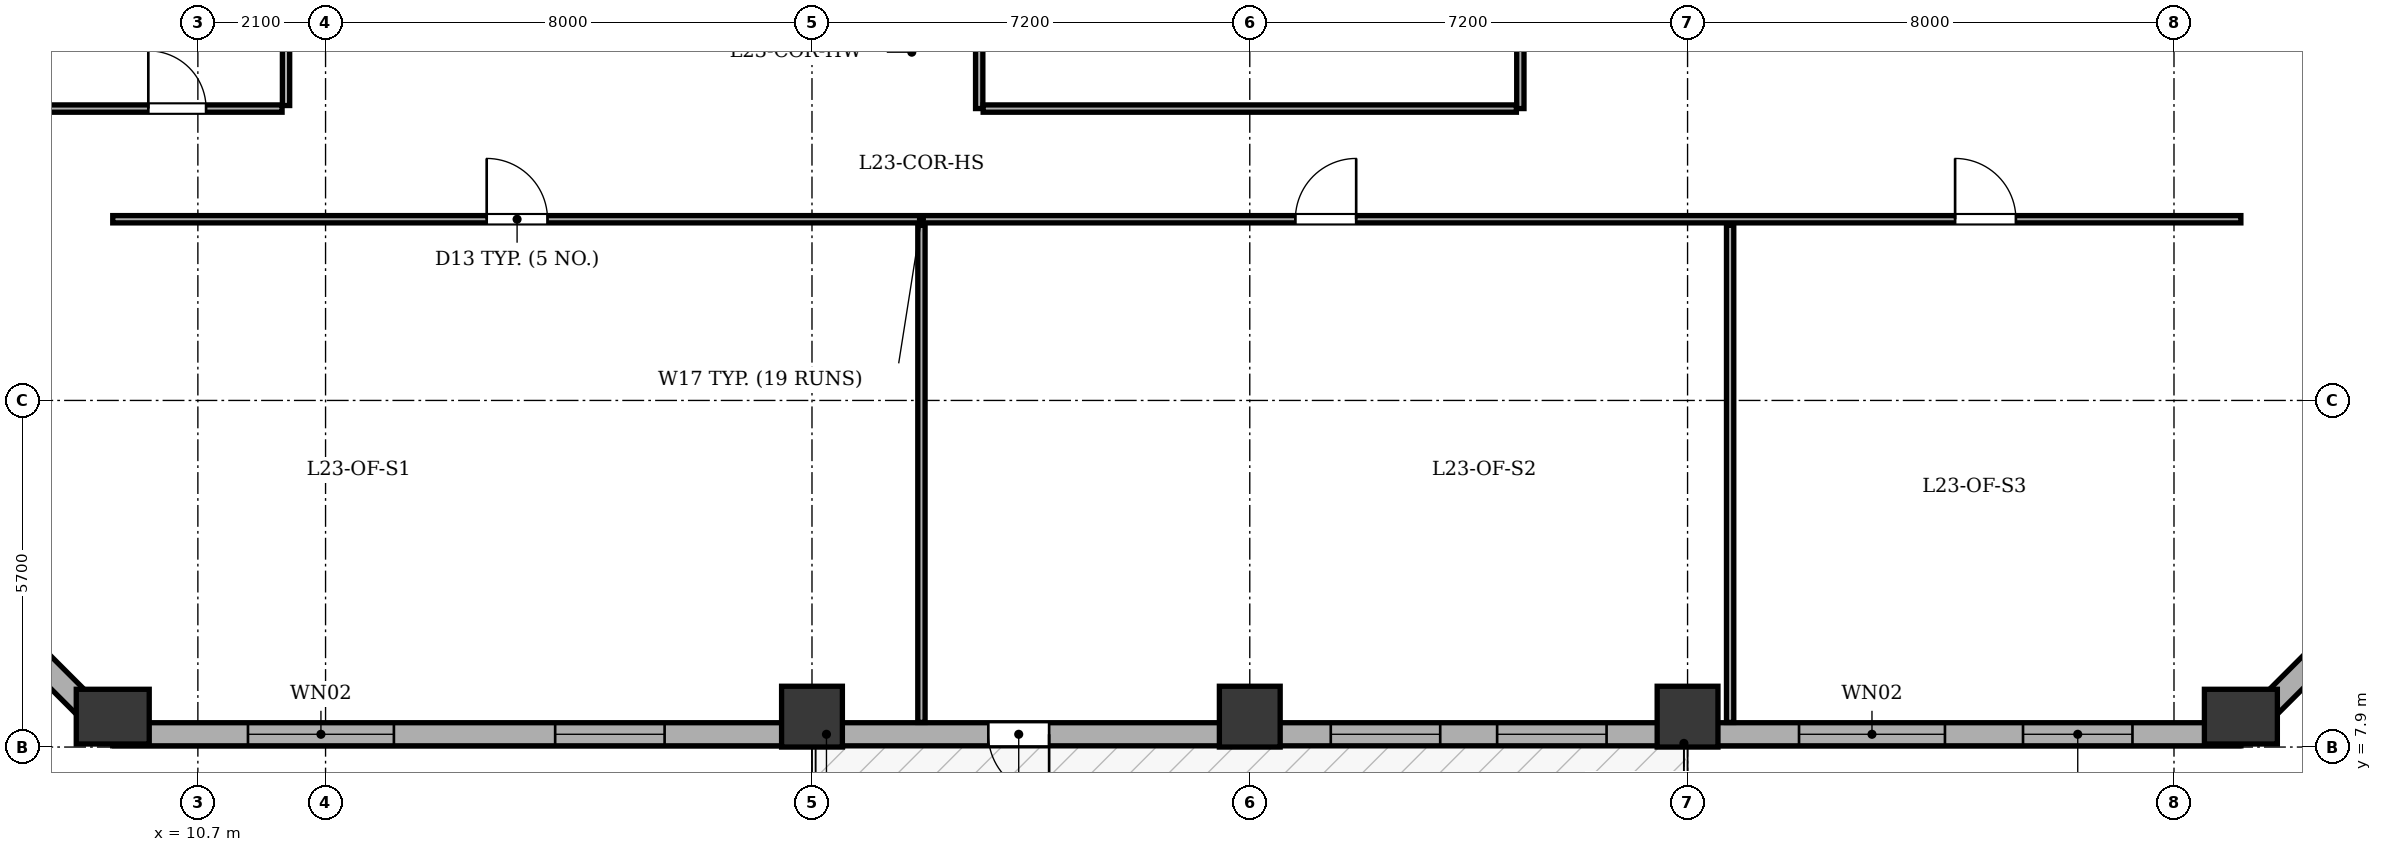
"""IFC4 building model, lengths in metres.
Left out: names, types, materials, properties, quantities, classifications, styles, units other than length and angle.
Written with IfcOpenShell. Run it as: python <this file> out.ifc"""

import sys

from ifc_helpers import new_model, si_unit, direction, frame, frame_2d, origin, origin_2d, place, context, subcontext, project, spatial, rectangle, extrude, element, fill, save


model = new_model("IFC4")
c1 = context("Model", 3, precision=1e-05, world=origin(), true_north=direction((0.0, 1.0)))
c2 = subcontext(c1, "Body", "Model", "MODEL_VIEW")
j1 = project(units=[si_unit("LENGTHUNIT", "METRE"), si_unit("PLANEANGLEUNIT", "RADIAN")], contexts=[c1])
p1 = place(None, origin())
s1 = spatial("IfcSite", under=j1, at=p1, CompositionType="ELEMENT")
p2 = place(p1, origin())
s2 = spatial("IfcBuilding", under=s1, at=p2, CompositionType="ELEMENT")
p3 = place(p2, frame((0.0, 0.0, 94.5)))
s3 = spatial("IfcBuildingStorey", under=s2, at=p3, CompositionType="ELEMENT", Elevation=94.5)
p4 = place(p3, frame((9.3, 8.4, 0.0), z_axis=(0.0, 0.0, 1.0), x_axis=(1.0, 0.0, 0.0)))
e1 = element("IfcColumn", 1, at=p4, inside=s3, PredefinedType="COLUMN", context=c2, shape_type="SweptSolid", body=[
    extrude(rectangle(XDim=0.9, YDim=1.2, at=origin_2d()), origin(), (0.0, 0.0, 1.0), 3.9),
])
for number, where, z_axis, x_axis in (
    (2, (20.8, 8.4, 0.0), (0.0, 0.0, 1.0), (1.0, 0.0, 0.0)),
    (3, (28.0, 8.4, 0.0), (0.0, 0.0, 1.0), (1.0, 0.0, 0.0)),
    (4, (35.2, 8.4, 0.0), (0.0, 0.0, 1.0), (1.0, 0.0, 0.0)),
):
    element("IfcColumn", number, at=place(p3, frame(where, z_axis=z_axis, x_axis=x_axis)), inside=s3, PredefinedType="COLUMN", context=c2, shape_type="SweptSolid", body=[
        extrude(rectangle(XDim=1.0, YDim=1.0, at=origin_2d()), origin(), (0.0, 0.0, 1.0), 3.9),
    ])
p5 = place(p3, frame((44.3, 8.4, 0.0), z_axis=(0.0, 0.0, 1.0), x_axis=(1.0, 0.0, 0.0)))
e5 = element("IfcColumn", 5, at=p5, inside=s3, PredefinedType="COLUMN", context=c2, shape_type="SweptSolid", body=[
    extrude(rectangle(XDim=0.9, YDim=1.2, at=origin_2d()), origin(), (0.0, 0.0, 1.0), 3.9),
])
p6 = place(p3, frame((44.3, 8.11, 0.0), z_axis=(0.0, 0.0, 1.0), x_axis=(-1.0, 0.0, 0.0)))
e6 = element("IfcWall", 6, at=p6, inside=s3, PredefinedType="STANDARD", context=c2, shape_type="SweptSolid", body=[
    extrude(rectangle(XDim=35.0, YDim=0.38, at=frame_2d((17.5, 0.0))), origin(), (0.0, 0.0, 1.0), 3.135),
])
p7 = place(p6, frame((19.6, 0.0, 0.0)))
e7 = element("IfcOpeningElement", 7, at=p7, cuts=e6, PredefinedType="OPENING", context=c2, shape_type="SweptSolid", body=[
    extrude(rectangle(XDim=1.0, YDim=2.02, at=frame_2d((0.5, 1.01))), frame((0.0, 0.2, 0.0), z_axis=(0.0, -1.0, 0.0), x_axis=(1.0, 0.0, 0.0)), (0.0, 0.0, 1.0), 0.4),
])
p8 = place(p6, frame((1.783, 0.0, 0.8)))
e8 = element("IfcOpeningElement", 8, at=p8, cuts=e6, PredefinedType="OPENING", context=c2, shape_type="SweptSolid", body=[
    extrude(rectangle(XDim=1.8, YDim=1.9, at=frame_2d((0.9, 0.95))), frame((0.0, 0.2, 0.0), z_axis=(0.0, -1.0, 0.0), x_axis=(1.0, 0.0, 0.0)), (0.0, 0.0, 1.0), 0.4),
])
p9 = place(p6, frame((4.867, 0.0, 0.8)))
e9 = element("IfcOpeningElement", 9, at=p9, cuts=e6, PredefinedType="OPENING", context=c2, shape_type="SweptSolid", body=[
    extrude(rectangle(XDim=2.4, YDim=1.9, at=frame_2d((1.2, 0.95))), frame((0.0, 0.2, 0.0), z_axis=(0.0, -1.0, 0.0), x_axis=(1.0, 0.0, 0.0)), (0.0, 0.0, 1.0), 0.4),
])
p10 = place(p6, frame((10.432, 0.0, 0.8)))
e10 = element("IfcOpeningElement", 10, at=p10, cuts=e6, PredefinedType="OPENING", context=c2, shape_type="SweptSolid", body=[
    extrude(rectangle(XDim=1.8, YDim=1.9, at=frame_2d((0.9, 0.95))), frame((0.0, 0.2, 0.0), z_axis=(0.0, -1.0, 0.0), x_axis=(1.0, 0.0, 0.0)), (0.0, 0.0, 1.0), 0.4),
])
p11 = place(p6, frame((13.168, 0.0, 0.8)))
e11 = element("IfcOpeningElement", 11, at=p11, cuts=e6, PredefinedType="OPENING", context=c2, shape_type="SweptSolid", body=[
    extrude(rectangle(XDim=1.8, YDim=1.9, at=frame_2d((0.9, 0.95))), frame((0.0, 0.2, 0.0), z_axis=(0.0, -1.0, 0.0), x_axis=(1.0, 0.0, 0.0)), (0.0, 0.0, 1.0), 0.4),
])
p12 = place(p6, frame((25.924, 0.0, 0.8)))
e12 = element("IfcOpeningElement", 12, at=p12, cuts=e6, PredefinedType="OPENING", context=c2, shape_type="SweptSolid", body=[
    extrude(rectangle(XDim=1.8, YDim=1.9, at=frame_2d((0.9, 0.95))), frame((0.0, 0.2, 0.0), z_axis=(0.0, -1.0, 0.0), x_axis=(1.0, 0.0, 0.0)), (0.0, 0.0, 1.0), 0.4),
])
p13 = place(p6, frame((30.376, 0.0, 0.8)))
e13 = element("IfcOpeningElement", 13, at=p13, cuts=e6, PredefinedType="OPENING", context=c2, shape_type="SweptSolid", body=[
    extrude(rectangle(XDim=2.4, YDim=1.9, at=frame_2d((1.2, 0.95))), frame((0.0, 0.2, 0.0), z_axis=(0.0, -1.0, 0.0), x_axis=(1.0, 0.0, 0.0)), (0.0, 0.0, 1.0), 0.4),
])
p14 = place(p3, frame((9.3, 8.11, 0.0), z_axis=(0.0, 0.0, 1.0), x_axis=(-0.707124801467, 0.707088760447, 0.0)))
e14 = element("IfcWall", 14, at=p14, inside=s3, PredefinedType="STANDARD", context=c2, shape_type="SweptSolid", body=[
    extrude(rectangle(XDim=6.774, YDim=0.38, at=frame_2d((3.387, 0.0))), origin(), (0.0, 0.0, 1.0), 3.135),
])
p15 = place(p14, frame((2.687, 0.0, 0.8)))
e15 = element("IfcOpeningElement", 15, at=p15, cuts=e14, PredefinedType="OPENING", context=c2, shape_type="SweptSolid", body=[
    extrude(rectangle(XDim=1.4, YDim=1.65, at=frame_2d((0.7, 0.825))), frame((0.0, 0.2, 0.0), z_axis=(0.0, -1.0, 0.0), x_axis=(1.0, 0.0, 0.0)), (0.0, 0.0, 1.0), 0.4),
])
p16 = place(p3, frame((49.09, 12.9, 0.0), z_axis=(0.0, 0.0, 1.0), x_axis=(-0.707124801467, -0.707088760447, 0.0)))
e16 = element("IfcWall", 16, at=p16, inside=s3, PredefinedType="STANDARD", context=c2, shape_type="SweptSolid", body=[
    extrude(rectangle(XDim=6.774, YDim=0.38, at=frame_2d((3.387, 0.0))), origin(), (0.0, 0.0, 1.0), 3.135),
])
p17 = place(p16, frame((2.687, 0.0, 0.8)))
e17 = element("IfcOpeningElement", 17, at=p17, cuts=e16, PredefinedType="OPENING", context=c2, shape_type="SweptSolid", body=[
    extrude(rectangle(XDim=1.4, YDim=1.65, at=frame_2d((0.7, 0.825))), frame((0.0, 0.2, 0.0), z_axis=(0.0, -1.0, 0.0), x_axis=(1.0, 0.0, 0.0)), (0.0, 0.0, 1.0), 0.4),
])
for number, where, z_axis, x_axis in (
    (18, (23.55, 18.4, 0.0), (0.0, 0.0, 1.0), (0.0, 1.0, 0.0)),
    (19, (32.45, 18.4, 0.0), (0.0, 0.0, 1.0), (0.0, 1.0, 0.0)),
):
    element("IfcWall", number, at=place(p3, frame(where, z_axis=z_axis, x_axis=x_axis)), inside=s3, PredefinedType="PARTITIONING", context=c2, shape_type="SweptSolid", body=[
        extrude(rectangle(XDim=3.485, YDim=0.12, at=frame_2d((1.743, 0.0))), origin(), (0.0, 0.0, 1.0), 3.6),
    ])
p18 = place(p3, frame((23.615, 18.4, 0.0), z_axis=(0.0, 0.0, 1.0), x_axis=(1.0, 0.0, 0.0)))
e20 = element("IfcWall", 20, at=p18, inside=s3, PredefinedType="PARTITIONING", context=c2, shape_type="SweptSolid", body=[
    extrude(rectangle(XDim=8.77, YDim=0.12, at=frame_2d((4.385, 0.0))), origin(), (0.0, 0.0, 1.0), 3.6),
])
p19 = place(p3, frame((9.3, 16.58, 0.0), z_axis=(0.0, 0.0, 1.0), x_axis=(1.0, 0.0, 0.0)))
e21 = element("IfcWall", 21, at=p19, inside=s3, PredefinedType="PARTITIONING", context=c2, shape_type="SweptSolid", body=[
    extrude(rectangle(XDim=35.0, YDim=0.12, at=frame_2d((17.5, 0.0))), origin(), (0.0, 0.0, 1.0), 3.6),
])
p20 = place(p19, frame((6.15, 0.0, 0.0)))
e22 = element("IfcOpeningElement", 22, at=p20, cuts=e21, PredefinedType="OPENING", context=c2, shape_type="SweptSolid", body=[
    extrude(rectangle(XDim=1.0, YDim=2.1, at=frame_2d((0.5, 1.05))), frame((0.0, 0.07, 0.0), z_axis=(0.0, -1.0, 0.0), x_axis=(1.0, 0.0, 0.0)), (0.0, 0.0, 1.0), 0.14),
])
p21 = place(p19, frame((19.45, 0.0, 0.0)))
e23 = element("IfcOpeningElement", 23, at=p21, cuts=e21, PredefinedType="OPENING", context=c2, shape_type="SweptSolid", body=[
    extrude(rectangle(XDim=1.0, YDim=2.1, at=frame_2d((0.5, 1.05))), frame((0.0, 0.07, 0.0), z_axis=(0.0, -1.0, 0.0), x_axis=(1.0, 0.0, 0.0)), (0.0, 0.0, 1.0), 0.14),
])
p22 = place(p19, frame((30.3, 0.0, 0.0)))
e24 = element("IfcOpeningElement", 24, at=p22, cuts=e21, PredefinedType="OPENING", context=c2, shape_type="SweptSolid", body=[
    extrude(rectangle(XDim=1.0, YDim=2.1, at=frame_2d((0.5, 1.05))), frame((0.0, 0.07, 0.0), z_axis=(0.0, -1.0, 0.0), x_axis=(1.0, 0.0, 0.0)), (0.0, 0.0, 1.0), 0.14),
])
p23 = place(p3, frame((22.6, 8.305, 0.0), z_axis=(0.0, 0.0, 1.0), x_axis=(0.0, 1.0, 0.0)))
e25 = element("IfcWall", 25, at=p23, inside=s3, PredefinedType="PARTITIONING", context=c2, shape_type="SweptSolid", body=[
    extrude(rectangle(XDim=8.175, YDim=0.12, at=frame_2d((4.087, 0.0))), origin(), (0.0, 0.0, 1.0), 3.135),
])
p24 = place(p3, frame((35.9, 8.305, 0.0), z_axis=(0.0, 0.0, 1.0), x_axis=(0.0, 1.0, 0.0)))
e26 = element("IfcWall", 26, at=p24, inside=s3, PredefinedType="PARTITIONING", context=c2, shape_type="SweptSolid", body=[
    extrude(rectangle(XDim=8.175, YDim=0.12, at=frame_2d((4.087, 0.0))), origin(), (0.0, 0.0, 1.0), 3.6),
])
p25 = place(p3, frame((12.15, 18.45, 0.0), z_axis=(0.0, 0.0, 1.0), x_axis=(0.0, 1.0, 0.0)))
e27 = element("IfcWall", 27, at=p25, inside=s3, PredefinedType="PARTITIONING", context=c2, shape_type="SweptSolid", body=[
    extrude(rectangle(XDim=17.5, YDim=0.12, at=frame_2d((8.75, 0.0))), origin(), (0.0, 0.0, 1.0), 3.6),
])
p26 = place(p3, frame((4.705, 18.4, 0.0), z_axis=(0.0, 0.0, 1.0), x_axis=(1.0, 0.0, 0.0)))
e28 = element("IfcWall", 28, at=p26, inside=s3, PredefinedType="PARTITIONING", context=c2, shape_type="SweptSolid", body=[
    extrude(rectangle(XDim=7.38, YDim=0.12, at=frame_2d((3.69, 0.0))), origin(), (0.0, 0.0, 1.0), 3.6),
])
p27 = place(p26, frame((5.18, 0.0, 0.0)))
e29 = element("IfcOpeningElement", 29, at=p27, cuts=e28, PredefinedType="OPENING", context=c2, shape_type="SweptSolid", body=[
    extrude(rectangle(XDim=0.95, YDim=2.1, at=frame_2d((0.475, 1.05))), frame((0.0, 0.07, 0.0), z_axis=(0.0, -1.0, 0.0), x_axis=(1.0, 0.0, 0.0)), (0.0, 0.0, 1.0), 0.14),
])
p28 = place(p7, origin())
e30 = element("IfcDoor", 30, at=p28, inside=s3, OperationType="SINGLE_SWING_LEFT", PredefinedType="DOOR", context=c2, shape_type="SweptSolid", body=[
    extrude(rectangle(XDim=1.0, YDim=2.02, at=frame_2d((0.5, 1.01))), frame((0.0, 0.025, 0.0), z_axis=(0.0, -1.0, 0.0), x_axis=(1.0, 0.0, 0.0)), (0.0, 0.0, 1.0), 0.05),
])
fill(e7, e30)
p29 = place(p8, origin())
e31 = element("IfcWindow", 31, at=p29, inside=s3, PartitioningType="SINGLE_PANEL", PredefinedType="WINDOW", context=c2, shape_type="SweptSolid", body=[
    extrude(rectangle(XDim=1.8, YDim=1.9, at=frame_2d((0.9, 0.95))), frame((0.0, -0.01, 0.0), z_axis=(0.0, -1.0, 0.0), x_axis=(1.0, 0.0, 0.0)), (0.0, 0.0, 1.0), 0.06),
])
fill(e8, e31)
p30 = place(p9, origin())
e32 = element("IfcWindow", 32, at=p30, inside=s3, PartitioningType="SINGLE_PANEL", PredefinedType="WINDOW", context=c2, shape_type="SweptSolid", body=[
    extrude(rectangle(XDim=2.4, YDim=1.9, at=frame_2d((1.2, 0.95))), frame((0.0, -0.01, 0.0), z_axis=(0.0, -1.0, 0.0), x_axis=(1.0, 0.0, 0.0)), (0.0, 0.0, 1.0), 0.06),
])
fill(e9, e32)
p31 = place(p10, origin())
e33 = element("IfcWindow", 33, at=p31, inside=s3, PartitioningType="SINGLE_PANEL", PredefinedType="WINDOW", context=c2, shape_type="SweptSolid", body=[
    extrude(rectangle(XDim=1.8, YDim=1.9, at=frame_2d((0.9, 0.95))), frame((0.0, -0.01, 0.0), z_axis=(0.0, -1.0, 0.0), x_axis=(1.0, 0.0, 0.0)), (0.0, 0.0, 1.0), 0.06),
])
fill(e10, e33)
p32 = place(p11, origin())
e34 = element("IfcWindow", 34, at=p32, inside=s3, PartitioningType="SINGLE_PANEL", PredefinedType="WINDOW", context=c2, shape_type="SweptSolid", body=[
    extrude(rectangle(XDim=1.8, YDim=1.9, at=frame_2d((0.9, 0.95))), frame((0.0, -0.01, 0.0), z_axis=(0.0, -1.0, 0.0), x_axis=(1.0, 0.0, 0.0)), (0.0, 0.0, 1.0), 0.06),
])
fill(e11, e34)
p33 = place(p12, origin())
e35 = element("IfcWindow", 35, at=p33, inside=s3, PartitioningType="SINGLE_PANEL", PredefinedType="WINDOW", context=c2, shape_type="SweptSolid", body=[
    extrude(rectangle(XDim=1.8, YDim=1.9, at=frame_2d((0.9, 0.95))), frame((0.0, -0.01, 0.0), z_axis=(0.0, -1.0, 0.0), x_axis=(1.0, 0.0, 0.0)), (0.0, 0.0, 1.0), 0.06),
])
fill(e12, e35)
p34 = place(p13, origin())
e36 = element("IfcWindow", 36, at=p34, inside=s3, PartitioningType="SINGLE_PANEL", PredefinedType="WINDOW", context=c2, shape_type="SweptSolid", body=[
    extrude(rectangle(XDim=2.4, YDim=1.9, at=frame_2d((1.2, 0.95))), frame((0.0, -0.01, 0.0), z_axis=(0.0, -1.0, 0.0), x_axis=(1.0, 0.0, 0.0)), (0.0, 0.0, 1.0), 0.06),
])
fill(e13, e36)
p35 = place(p20, origin())
e37 = element("IfcDoor", 37, at=p35, inside=s3, OperationType="SINGLE_SWING_LEFT", PredefinedType="DOOR", context=c2, shape_type="SweptSolid", body=[
    extrude(rectangle(XDim=1.0, YDim=2.1, at=frame_2d((0.5, 1.05))), frame((0.0, 0.025, 0.0), z_axis=(0.0, -1.0, 0.0), x_axis=(1.0, 0.0, 0.0)), (0.0, 0.0, 1.0), 0.05),
])
fill(e22, e37)
p36 = place(p21, origin())
e38 = element("IfcDoor", 38, at=p36, inside=s3, OperationType="SINGLE_SWING_RIGHT", PredefinedType="DOOR", context=c2, shape_type="SweptSolid", body=[
    extrude(rectangle(XDim=1.0, YDim=2.1, at=frame_2d((0.5, 1.05))), frame((0.0, 0.025, 0.0), z_axis=(0.0, -1.0, 0.0), x_axis=(1.0, 0.0, 0.0)), (0.0, 0.0, 1.0), 0.05),
])
fill(e23, e38)
p37 = place(p22, origin())
e39 = element("IfcDoor", 39, at=p37, inside=s3, OperationType="SINGLE_SWING_LEFT", PredefinedType="DOOR", context=c2, shape_type="SweptSolid", body=[
    extrude(rectangle(XDim=1.0, YDim=2.1, at=frame_2d((0.5, 1.05))), frame((0.0, 0.025, 0.0), z_axis=(0.0, -1.0, 0.0), x_axis=(1.0, 0.0, 0.0)), (0.0, 0.0, 1.0), 0.05),
])
fill(e24, e39)
p38 = place(p27, origin())
e40 = element("IfcDoor", 40, at=p38, inside=s3, OperationType="SINGLE_SWING_LEFT", PredefinedType="DOOR", context=c2, shape_type="SweptSolid", body=[
    extrude(rectangle(XDim=0.95, YDim=2.1, at=frame_2d((0.475, 1.05))), frame((0.0, 0.025, 0.0), z_axis=(0.0, -1.0, 0.0), x_axis=(1.0, 0.0, 0.0)), (0.0, 0.0, 1.0), 0.05),
])
fill(e29, e40)
save(model, sys.argv[1])
